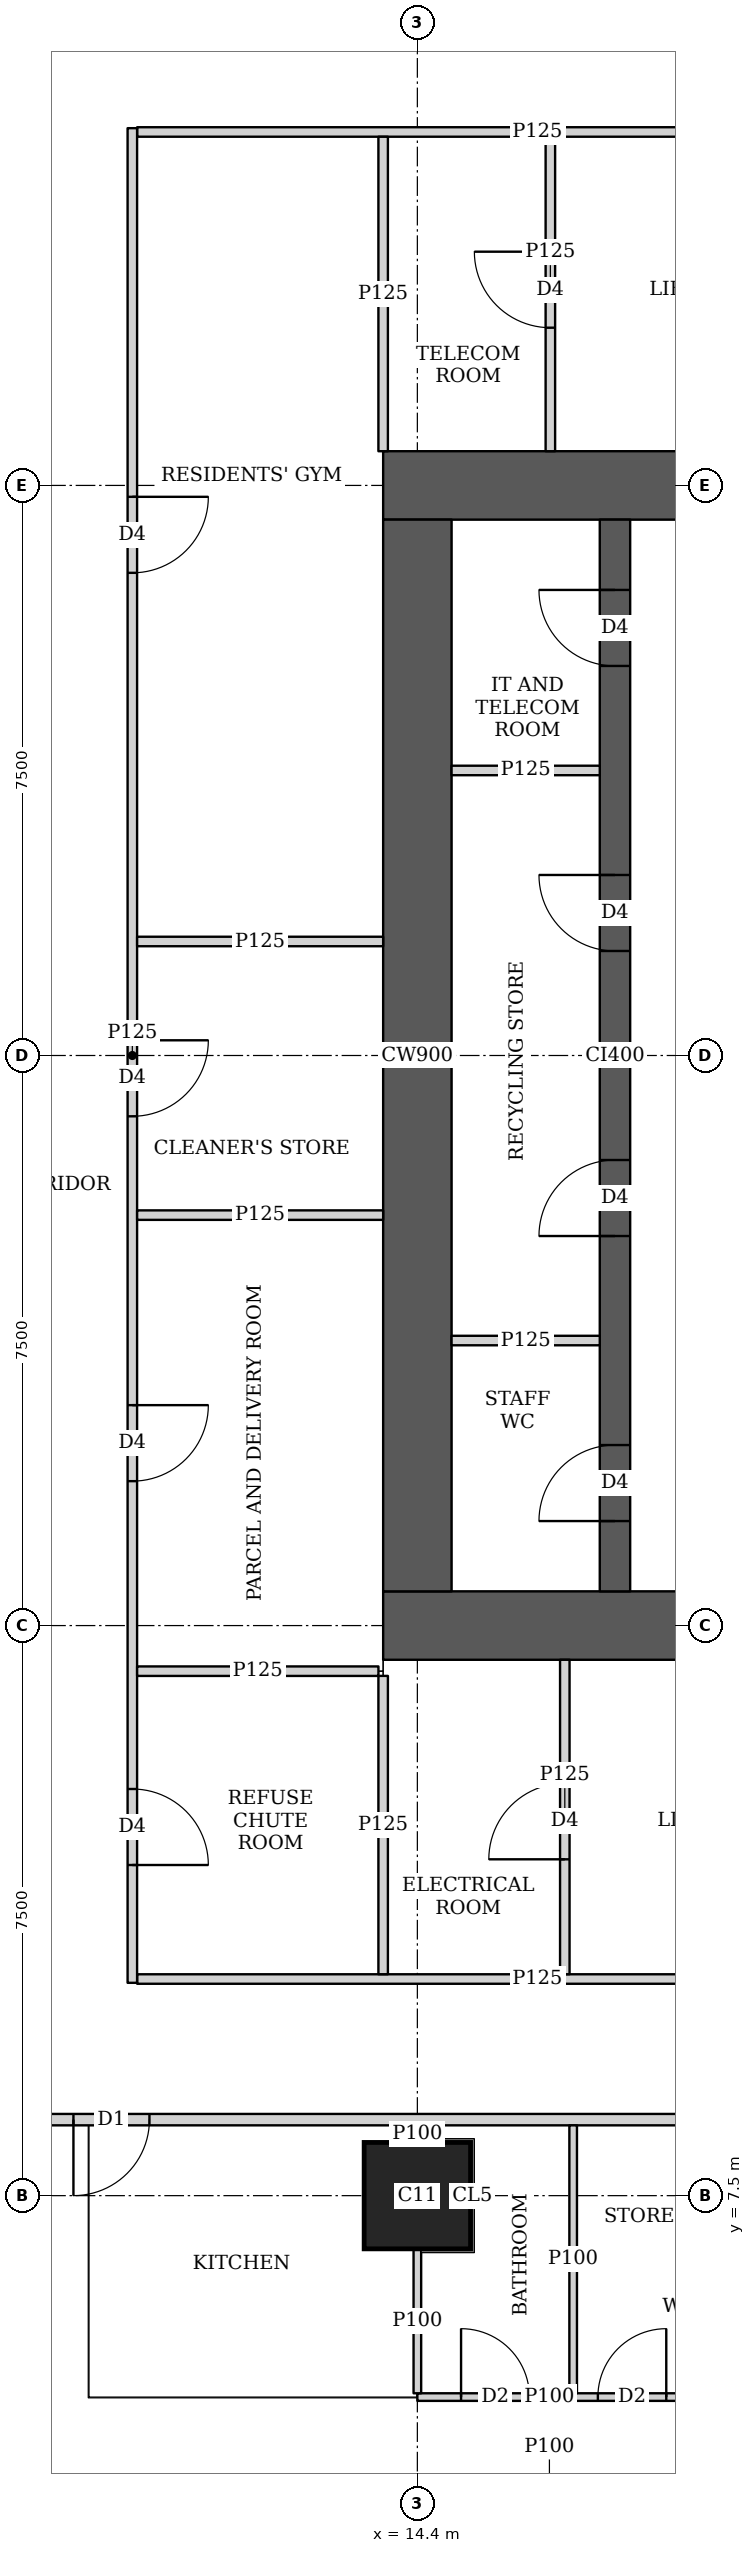
"""IFC4 building model, lengths in metres.
Left out: names, types, materials, properties, quantities, classifications, styles, units other than length and angle.
Written with IfcOpenShell. Run it as: python <this file> out.ifc"""

import sys

from ifc_helpers import new_model, si_unit, direction, frame, frame_2d, origin, origin_2d, place, context, subcontext, project, spatial, rectangle, extrude, element, fill, save


model = new_model("IFC4")
c1 = context("Model", 3, precision=1e-05, world=origin(), true_north=direction((0.0, 1.0)))
c2 = subcontext(c1, "Body", "Model", "MODEL_VIEW")
j1 = project(units=[si_unit("LENGTHUNIT", "METRE"), si_unit("PLANEANGLEUNIT", "RADIAN")], contexts=[c1])
p1 = place(None, origin())
s1 = spatial("IfcSite", under=j1, at=p1, CompositionType="ELEMENT")
p2 = place(p1, origin())
s2 = spatial("IfcBuilding", under=s1, at=p2, CompositionType="ELEMENT")
p3 = place(p2, frame((0.0, 0.0, 204.95)))
s3 = spatial("IfcBuildingStorey", under=s2, at=p3, CompositionType="ELEMENT", Elevation=204.95)
p4 = place(p3, frame((14.4, 7.5, 0.0), z_axis=(0.0, 0.0, 1.0), x_axis=(1.0, 0.0, 0.0)))
e1 = element("IfcColumn", 1, at=p4, inside=s3, PredefinedType="COLUMN", context=c2, shape_type="SweptSolid", body=[
    extrude(rectangle(XDim=1.4, YDim=1.4, at=origin_2d()), origin(), (0.0, 0.0, 1.0), 3.75),
])
p5 = place(p3, frame((13.95, 15.0, 0.0), z_axis=(0.0, 0.0, 1.0), x_axis=(1.0, 0.0, 0.0)))
e2 = element("IfcWall", 2, at=p5, inside=s3, PredefinedType="SHEAR", context=c2, shape_type="SweptSolid", body=[
    extrude(rectangle(XDim=15.3, YDim=0.9, at=frame_2d((7.65, 0.0))), origin(), (0.0, 0.0, 1.0), 3.75),
])
p6 = place(p5, frame((4.45, 0.0, 0.0)))
e3 = element("IfcOpeningElement", 3, at=p6, cuts=e2, PredefinedType="OPENING", context=c2, shape_type="SweptSolid", body=[
    extrude(rectangle(XDim=1.8, YDim=2.1, at=frame_2d((0.9, 1.05))), frame((0.0, 0.46, 0.0), z_axis=(0.0, -1.0, 0.0), x_axis=(1.0, 0.0, 0.0)), (0.0, 0.0, 1.0), 0.92),
])
p7 = place(p5, frame((10.7, 0.0, 0.0)))
e4 = element("IfcOpeningElement", 4, at=p7, cuts=e2, PredefinedType="OPENING", context=c2, shape_type="SweptSolid", body=[
    extrude(rectangle(XDim=1.1, YDim=2.1, at=frame_2d((0.55, 1.05))), frame((0.0, 0.46, 0.0), z_axis=(0.0, -1.0, 0.0), x_axis=(1.0, 0.0, 0.0)), (0.0, 0.0, 1.0), 0.92),
])
p8 = place(p3, frame((13.95, 30.0, 0.0), z_axis=(0.0, 0.0, 1.0), x_axis=(1.0, 0.0, 0.0)))
e5 = element("IfcWall", 5, at=p8, inside=s3, PredefinedType="SHEAR", context=c2, shape_type="SweptSolid", body=[
    extrude(rectangle(XDim=15.3, YDim=0.9, at=frame_2d((7.65, 0.0))), origin(), (0.0, 0.0, 1.0), 3.75),
])
p9 = place(p8, frame((4.45, 0.0, 0.0)))
e6 = element("IfcOpeningElement", 6, at=p9, cuts=e5, PredefinedType="OPENING", context=c2, shape_type="SweptSolid", body=[
    extrude(rectangle(XDim=1.8, YDim=2.1, at=frame_2d((0.9, 1.05))), frame((0.0, 0.46, 0.0), z_axis=(0.0, -1.0, 0.0), x_axis=(1.0, 0.0, 0.0)), (0.0, 0.0, 1.0), 0.92),
])
p10 = place(p8, frame((10.7, 0.0, 0.0)))
e7 = element("IfcOpeningElement", 7, at=p10, cuts=e5, PredefinedType="OPENING", context=c2, shape_type="SweptSolid", body=[
    extrude(rectangle(XDim=1.1, YDim=2.1, at=frame_2d((0.55, 1.05))), frame((0.0, 0.46, 0.0), z_axis=(0.0, -1.0, 0.0), x_axis=(1.0, 0.0, 0.0)), (0.0, 0.0, 1.0), 0.92),
])
p11 = place(p3, frame((14.4, 15.45, 0.0), z_axis=(0.0, 0.0, 1.0), x_axis=(0.0, 1.0, 0.0)))
e8 = element("IfcWall", 8, at=p11, inside=s3, PredefinedType="SHEAR", context=c2, shape_type="SweptSolid", body=[
    extrude(rectangle(XDim=14.1, YDim=0.9, at=frame_2d((7.05, 0.0))), origin(), (0.0, 0.0, 1.0), 3.75),
])
p12 = place(p3, frame((17.0, 15.45, 0.0), z_axis=(0.0, 0.0, 1.0), x_axis=(0.0, 1.0, 0.0)))
e9 = element("IfcWall", 9, at=p12, inside=s3, PredefinedType="SHEAR", context=c2, shape_type="SweptSolid", body=[
    extrude(rectangle(XDim=14.1, YDim=0.4, at=frame_2d((7.05, 0.0))), origin(), (0.0, 0.0, 1.0), 3.75),
])
p13 = place(p12, frame((0.925, 0.0, 0.0)))
e10 = element("IfcOpeningElement", 10, at=p13, cuts=e9, PredefinedType="OPENING", context=c2, shape_type="SweptSolid", body=[
    extrude(rectangle(XDim=1.0, YDim=2.1, at=frame_2d((0.5, 1.05))), frame((0.0, 0.21, 0.0), z_axis=(0.0, -1.0, 0.0), x_axis=(1.0, 0.0, 0.0)), (0.0, 0.0, 1.0), 0.42),
])
p14 = place(p12, frame((4.675, 0.0, 0.0)))
e11 = element("IfcOpeningElement", 11, at=p14, cuts=e9, PredefinedType="OPENING", context=c2, shape_type="SweptSolid", body=[
    extrude(rectangle(XDim=1.0, YDim=2.1, at=frame_2d((0.5, 1.05))), frame((0.0, 0.21, 0.0), z_axis=(0.0, -1.0, 0.0), x_axis=(1.0, 0.0, 0.0)), (0.0, 0.0, 1.0), 0.42),
])
p15 = place(p12, frame((8.425, 0.0, 0.0)))
e12 = element("IfcOpeningElement", 12, at=p15, cuts=e9, PredefinedType="OPENING", context=c2, shape_type="SweptSolid", body=[
    extrude(rectangle(XDim=1.0, YDim=2.1, at=frame_2d((0.5, 1.05))), frame((0.0, 0.21, 0.0), z_axis=(0.0, -1.0, 0.0), x_axis=(1.0, 0.0, 0.0)), (0.0, 0.0, 1.0), 0.42),
])
p16 = place(p12, frame((12.175, 0.0, 0.0)))
e13 = element("IfcOpeningElement", 13, at=p16, cuts=e9, PredefinedType="OPENING", context=c2, shape_type="SweptSolid", body=[
    extrude(rectangle(XDim=1.0, YDim=2.1, at=frame_2d((0.5, 1.05))), frame((0.0, 0.21, 0.0), z_axis=(0.0, -1.0, 0.0), x_axis=(1.0, 0.0, 0.0)), (0.0, 0.0, 1.0), 0.42),
])
p17 = place(p3, frame((40.053, 8.5, 0.0), z_axis=(0.0, 0.0, 1.0), x_axis=(-1.0, 0.0, 0.0)))
e14 = element("IfcWall", 14, at=p17, inside=s3, PredefinedType="SOLIDWALL", context=c2, shape_type="SweptSolid", body=[
    extrude(rectangle(XDim=31.052, YDim=0.15, at=frame_2d((15.526, 0.0))), origin(), (0.0, 0.0, 1.0), 3.5),
])
p18 = place(p17, frame((29.178, 0.0, 0.0)))
e15 = element("IfcOpeningElement", 15, at=p18, cuts=e14, PredefinedType="OPENING", context=c2, shape_type="SweptSolid", body=[
    extrude(rectangle(XDim=1.0, YDim=2.1, at=frame_2d((0.5, 1.05))), frame((0.0, 0.085, 0.0), z_axis=(0.0, -1.0, 0.0), x_axis=(1.0, 0.0, 0.0)), (0.0, 0.0, 1.0), 0.17),
])
p19 = place(p17, frame((19.953, 0.0, 0.0)))
e16 = element("IfcOpeningElement", 16, at=p19, cuts=e14, PredefinedType="OPENING", context=c2, shape_type="SweptSolid", body=[
    extrude(rectangle(XDim=1.0, YDim=2.1, at=frame_2d((0.5, 1.05))), frame((0.0, 0.085, 0.0), z_axis=(0.0, -1.0, 0.0), x_axis=(1.0, 0.0, 0.0)), (0.0, 0.0, 1.0), 0.17),
])
p20 = place(p17, frame((12.753, 0.0, 0.0)))
e17 = element("IfcOpeningElement", 17, at=p20, cuts=e14, PredefinedType="OPENING", context=c2, shape_type="SweptSolid", body=[
    extrude(rectangle(XDim=1.0, YDim=2.1, at=frame_2d((0.5, 1.05))), frame((0.0, 0.085, 0.0), z_axis=(0.0, -1.0, 0.0), x_axis=(1.0, 0.0, 0.0)), (0.0, 0.0, 1.0), 0.17),
])
p21 = place(p17, frame((0.15, 0.0, 0.0)))
e18 = element("IfcOpeningElement", 18, at=p21, cuts=e14, PredefinedType="OPENING", context=c2, shape_type="SweptSolid", body=[
    extrude(rectangle(XDim=1.0, YDim=2.1, at=frame_2d((0.5, 1.05))), frame((0.0, 0.085, 0.0), z_axis=(0.0, -1.0, 0.0), x_axis=(1.0, 0.0, 0.0)), (0.0, 0.0, 1.0), 0.17),
])
p22 = place(p3, frame((17.875, 4.85, 0.0), z_axis=(0.0, 0.0, 1.0), x_axis=(-1.0, 0.0, 0.0)))
e19 = element("IfcWall", 19, at=p22, inside=s3, PredefinedType="PARTITIONING", context=c2, shape_type="SweptSolid", body=[
    extrude(rectangle(XDim=3.475, YDim=0.1, at=frame_2d((1.738, 0.0))), origin(), (0.0, 0.0, 1.0), 3.5),
])
p23 = place(p22, frame((2.0, 0.0, 0.0)))
e20 = element("IfcOpeningElement", 20, at=p23, cuts=e19, PredefinedType="OPENING", context=c2, shape_type="SweptSolid", body=[
    extrude(rectangle(XDim=0.9, YDim=2.1, at=frame_2d((0.45, 1.05))), frame((0.0, 0.06, 0.0), z_axis=(0.0, -1.0, 0.0), x_axis=(1.0, 0.0, 0.0)), (0.0, 0.0, 1.0), 0.12),
])
p24 = place(p22, frame((0.2, 0.0, 0.0)))
e21 = element("IfcOpeningElement", 21, at=p24, cuts=e19, PredefinedType="OPENING", context=c2, shape_type="SweptSolid", body=[
    extrude(rectangle(XDim=0.9, YDim=2.1, at=frame_2d((0.45, 1.05))), frame((0.0, 0.06, 0.0), z_axis=(0.0, -1.0, 0.0), x_axis=(1.0, 0.0, 0.0)), (0.0, 0.0, 1.0), 0.12),
])
p25 = place(p3, frame((14.4, 4.9, 0.0), z_axis=(0.0, 0.0, 1.0), x_axis=(0.0, 1.0, 0.0)))
e22 = element("IfcWall", 22, at=p25, inside=s3, PredefinedType="PARTITIONING", context=c2, shape_type="SweptSolid", body=[
    extrude(rectangle(XDim=1.899, YDim=0.1, at=frame_2d((0.95, 0.0))), origin(), (0.0, 0.0, 1.0), 3.5),
])
p26 = place(p3, frame((14.4, 8.201, 0.0), z_axis=(0.0, 0.0, 1.0), x_axis=(0.0, 1.0, 0.0)))
e23 = element("IfcWall", 23, at=p26, inside=s3, PredefinedType="PARTITIONING", context=c2, shape_type="SweptSolid", body=[
    extrude(rectangle(XDim=0.224, YDim=0.1, at=frame_2d((0.112, 0.0))), origin(), (0.0, 0.0, 1.0), 3.5),
])
p27 = place(p3, frame((16.45, 4.9, 0.0), z_axis=(0.0, 0.0, 1.0), x_axis=(0.0, 1.0, 0.0)))
e24 = element("IfcWall", 24, at=p27, inside=s3, PredefinedType="PARTITIONING", context=c2, shape_type="SweptSolid", body=[
    extrude(rectangle(XDim=3.525, YDim=0.1, at=frame_2d((1.763, 0.0))), origin(), (0.0, 0.0, 1.0), 3.5),
])
p28 = place(p3, frame((10.65, 10.3, 0.0), z_axis=(0.0, 0.0, 1.0), x_axis=(0.0, 1.0, 0.0)))
e25 = element("IfcWall", 25, at=p28, inside=s3, PredefinedType="PARTITIONING", context=c2, shape_type="SweptSolid", body=[
    extrude(rectangle(XDim=24.4, YDim=0.125, at=frame_2d((12.2, 0.0))), origin(), (0.0, 0.0, 1.0), 3.5),
])
p29 = place(p28, frame((1.55, 0.0, 0.0)))
e26 = element("IfcOpeningElement", 26, at=p29, cuts=e25, PredefinedType="OPENING", context=c2, shape_type="SweptSolid", body=[
    extrude(rectangle(XDim=1.0, YDim=2.1, at=frame_2d((0.5, 1.05))), frame((0.0, 0.073, 0.0), z_axis=(0.0, -1.0, 0.0), x_axis=(1.0, 0.0, 0.0)), (0.0, 0.0, 1.0), 0.145),
])
p30 = place(p28, frame((6.6, 0.0, 0.0)))
e27 = element("IfcOpeningElement", 27, at=p30, cuts=e25, PredefinedType="OPENING", context=c2, shape_type="SweptSolid", body=[
    extrude(rectangle(XDim=1.0, YDim=2.1, at=frame_2d((0.5, 1.05))), frame((0.0, 0.073, 0.0), z_axis=(0.0, -1.0, 0.0), x_axis=(1.0, 0.0, 0.0)), (0.0, 0.0, 1.0), 0.145),
])
p31 = place(p28, frame((11.4, 0.0, 0.0)))
e28 = element("IfcOpeningElement", 28, at=p31, cuts=e25, PredefinedType="OPENING", context=c2, shape_type="SweptSolid", body=[
    extrude(rectangle(XDim=1.0, YDim=2.1, at=frame_2d((0.5, 1.05))), frame((0.0, 0.073, 0.0), z_axis=(0.0, -1.0, 0.0), x_axis=(1.0, 0.0, 0.0)), (0.0, 0.0, 1.0), 0.145),
])
p32 = place(p28, frame((18.55, 0.0, 0.0)))
e29 = element("IfcOpeningElement", 29, at=p32, cuts=e25, PredefinedType="OPENING", context=c2, shape_type="SweptSolid", body=[
    extrude(rectangle(XDim=1.0, YDim=2.1, at=frame_2d((0.5, 1.05))), frame((0.0, 0.073, 0.0), z_axis=(0.0, -1.0, 0.0), x_axis=(1.0, 0.0, 0.0)), (0.0, 0.0, 1.0), 0.145),
])
p33 = place(p3, frame((10.713, 14.4, 0.0), z_axis=(0.0, 0.0, 1.0), x_axis=(1.0, 0.0, 0.0)))
e30 = element("IfcWall", 30, at=p33, inside=s3, PredefinedType="PARTITIONING", context=c2, shape_type="SweptSolid", body=[
    extrude(rectangle(XDim=3.175, YDim=0.125, at=frame_2d((1.587, 0.0))), origin(), (0.0, 0.0, 1.0), 3.5),
])
for number, where, z_axis, x_axis in (
    (31, (10.713, 20.4, 0.0), (0.0, 0.0, 1.0), (1.0, 0.0, 0.0)),
    (32, (10.713, 24.0, 0.0), (0.0, 0.0, 1.0), (1.0, 0.0, 0.0)),
):
    element("IfcWall", number, at=place(p3, frame(where, z_axis=z_axis, x_axis=x_axis)), inside=s3, PredefinedType="PARTITIONING", context=c2, shape_type="SweptSolid", body=[
        extrude(rectangle(XDim=3.237, YDim=0.125, at=frame_2d((1.619, 0.0))), origin(), (0.0, 0.0, 1.0), 3.5),
    ])
p34 = place(p3, frame((13.95, 10.413, 0.0), z_axis=(0.0, 0.0, 1.0), x_axis=(0.0, 1.0, 0.0)))
e33 = element("IfcWall", 33, at=p34, inside=s3, PredefinedType="PARTITIONING", context=c2, shape_type="SweptSolid", body=[
    extrude(rectangle(XDim=3.925, YDim=0.125, at=frame_2d((1.962, 0.0))), origin(), (0.0, 0.0, 1.0), 3.5),
])
p35 = place(p3, frame((13.95, 30.45, 0.0), z_axis=(0.0, 0.0, 1.0), x_axis=(0.0, 1.0, 0.0)))
e34 = element("IfcWall", 34, at=p35, inside=s3, PredefinedType="PARTITIONING", context=c2, shape_type="SweptSolid", body=[
    extrude(rectangle(XDim=4.137, YDim=0.125, at=frame_2d((2.068, 0.0))), origin(), (0.0, 0.0, 1.0), 3.5),
])
p36 = place(p3, frame((10.713, 10.35, 0.0), z_axis=(0.0, 0.0, 1.0), x_axis=(1.0, 0.0, 0.0)))
e35 = element("IfcWall", 35, at=p36, inside=s3, PredefinedType="PARTITIONING", context=c2, shape_type="SweptSolid", body=[
    extrude(rectangle(XDim=10.537, YDim=0.125, at=frame_2d((5.269, 0.0))), origin(), (0.0, 0.0, 1.0), 3.5),
])
p37 = place(p36, frame((7.282, 0.0, 0.0)))
e36 = element("IfcOpeningElement", 36, at=p37, cuts=e35, PredefinedType="OPENING", context=c2, shape_type="SweptSolid", body=[
    extrude(rectangle(XDim=1.8, YDim=2.1, at=frame_2d((0.9, 1.05))), frame((0.0, 0.073, 0.0), z_axis=(0.0, -1.0, 0.0), x_axis=(1.0, 0.0, 0.0)), (0.0, 0.0, 1.0), 0.145),
])
p38 = place(p3, frame((10.713, 34.65, 0.0), z_axis=(0.0, 0.0, 1.0), x_axis=(1.0, 0.0, 0.0)))
e37 = element("IfcWall", 37, at=p38, inside=s3, PredefinedType="PARTITIONING", context=c2, shape_type="SweptSolid", body=[
    extrude(rectangle(XDim=10.537, YDim=0.125, at=frame_2d((5.269, 0.0))), origin(), (0.0, 0.0, 1.0), 3.5),
])
p39 = place(p38, frame((7.187, 0.0, 0.0)))
e38 = element("IfcOpeningElement", 38, at=p39, cuts=e37, PredefinedType="OPENING", context=c2, shape_type="SweptSolid", body=[
    extrude(rectangle(XDim=1.8, YDim=2.1, at=frame_2d((0.9, 1.05))), frame((0.0, 0.073, 0.0), z_axis=(0.0, -1.0, 0.0), x_axis=(1.0, 0.0, 0.0)), (0.0, 0.0, 1.0), 0.145),
])
p40 = place(p3, frame((16.34, 10.413, 0.0), z_axis=(0.0, 0.0, 1.0), x_axis=(0.0, 1.0, 0.0)))
e39 = element("IfcWall", 39, at=p40, inside=s3, PredefinedType="PARTITIONING", context=c2, shape_type="SweptSolid", body=[
    extrude(rectangle(XDim=4.137, YDim=0.125, at=frame_2d((2.068, 0.0))), origin(), (0.0, 0.0, 1.0), 3.5),
])
p41 = place(p40, frame((1.512, 0.0, 0.0)))
e40 = element("IfcOpeningElement", 40, at=p41, cuts=e39, PredefinedType="OPENING", context=c2, shape_type="SweptSolid", body=[
    extrude(rectangle(XDim=1.0, YDim=2.1, at=frame_2d((0.5, 1.05))), frame((0.0, 0.073, 0.0), z_axis=(0.0, -1.0, 0.0), x_axis=(1.0, 0.0, 0.0)), (0.0, 0.0, 1.0), 0.145),
])
p42 = place(p3, frame((16.15, 30.45, 0.0), z_axis=(0.0, 0.0, 1.0), x_axis=(0.0, 1.0, 0.0)))
e41 = element("IfcWall", 41, at=p42, inside=s3, PredefinedType="PARTITIONING", context=c2, shape_type="SweptSolid", body=[
    extrude(rectangle(XDim=4.137, YDim=0.125, at=frame_2d((2.068, 0.0))), origin(), (0.0, 0.0, 1.0), 3.5),
])
p43 = place(p42, frame((1.625, 0.0, 0.0)))
e42 = element("IfcOpeningElement", 42, at=p43, cuts=e41, PredefinedType="OPENING", context=c2, shape_type="SweptSolid", body=[
    extrude(rectangle(XDim=1.0, YDim=2.1, at=frame_2d((0.5, 1.05))), frame((0.0, 0.073, 0.0), z_axis=(0.0, -1.0, 0.0), x_axis=(1.0, 0.0, 0.0)), (0.0, 0.0, 1.0), 0.145),
])
for number, where, z_axis, x_axis in (
    (43, (14.85, 18.75, 0.0), (0.0, 0.0, 1.0), (1.0, 0.0, 0.0)),
    (44, (14.85, 26.25, 0.0), (0.0, 0.0, 1.0), (1.0, 0.0, 0.0)),
):
    element("IfcWall", number, at=place(p3, frame(where, z_axis=z_axis, x_axis=x_axis)), inside=s3, PredefinedType="PARTITIONING", context=c2, shape_type="SweptSolid", body=[
        extrude(rectangle(XDim=1.95, YDim=0.125, at=frame_2d((0.975, 0.0))), origin(), (0.0, 0.0, 1.0), 3.5),
    ])
p44 = place(p23, origin())
e45 = element("IfcDoor", 45, at=p44, inside=s3, OperationType="SINGLE_SWING_LEFT", PredefinedType="DOOR", context=c2, shape_type="SweptSolid", body=[
    extrude(rectangle(XDim=0.9, YDim=2.1, at=frame_2d((0.45, 1.05))), frame((0.0, 0.025, 0.0), z_axis=(0.0, -1.0, 0.0), x_axis=(1.0, 0.0, 0.0)), (0.0, 0.0, 1.0), 0.05),
])
fill(e20, e45)
p45 = place(p24, origin())
e46 = element("IfcDoor", 46, at=p45, inside=s3, OperationType="SINGLE_SWING_RIGHT", PredefinedType="DOOR", context=c2, shape_type="SweptSolid", body=[
    extrude(rectangle(XDim=0.9, YDim=2.1, at=frame_2d((0.45, 1.05))), frame((0.0, 0.025, 0.0), z_axis=(0.0, -1.0, 0.0), x_axis=(1.0, 0.0, 0.0)), (0.0, 0.0, 1.0), 0.05),
])
fill(e21, e46)
p46 = place(p18, origin())
e47 = element("IfcDoor", 47, at=p46, inside=s3, OperationType="SINGLE_SWING_RIGHT", PredefinedType="DOOR", context=c2, shape_type="SweptSolid", body=[
    extrude(rectangle(XDim=1.0, YDim=2.1, at=frame_2d((0.5, 1.05))), frame((0.0, 0.025, 0.0), z_axis=(0.0, -1.0, 0.0), x_axis=(1.0, 0.0, 0.0)), (0.0, 0.0, 1.0), 0.05),
])
fill(e15, e47)
p47 = place(p29, origin())
e48 = element("IfcDoor", 48, at=p47, inside=s3, OperationType="SINGLE_SWING_RIGHT", PredefinedType="DOOR", context=c2, shape_type="SweptSolid", body=[
    extrude(rectangle(XDim=1.0, YDim=2.1, at=frame_2d((0.5, 1.05))), frame((0.0, 0.025, 0.0), z_axis=(0.0, -1.0, 0.0), x_axis=(1.0, 0.0, 0.0)), (0.0, 0.0, 1.0), 0.05),
])
fill(e26, e48)
p48 = place(p30, origin())
e49 = element("IfcDoor", 49, at=p48, inside=s3, OperationType="SINGLE_SWING_LEFT", PredefinedType="DOOR", context=c2, shape_type="SweptSolid", body=[
    extrude(rectangle(XDim=1.0, YDim=2.1, at=frame_2d((0.5, 1.05))), frame((0.0, 0.025, 0.0), z_axis=(0.0, -1.0, 0.0), x_axis=(1.0, 0.0, 0.0)), (0.0, 0.0, 1.0), 0.05),
])
fill(e27, e49)
p49 = place(p31, origin())
e50 = element("IfcDoor", 50, at=p49, inside=s3, OperationType="SINGLE_SWING_LEFT", PredefinedType="DOOR", context=c2, shape_type="SweptSolid", body=[
    extrude(rectangle(XDim=1.0, YDim=2.1, at=frame_2d((0.5, 1.05))), frame((0.0, 0.025, 0.0), z_axis=(0.0, -1.0, 0.0), x_axis=(1.0, 0.0, 0.0)), (0.0, 0.0, 1.0), 0.05),
])
fill(e28, e50)
p50 = place(p32, origin())
e51 = element("IfcDoor", 51, at=p50, inside=s3, OperationType="SINGLE_SWING_LEFT", PredefinedType="DOOR", context=c2, shape_type="SweptSolid", body=[
    extrude(rectangle(XDim=1.0, YDim=2.1, at=frame_2d((0.5, 1.05))), frame((0.0, 0.025, 0.0), z_axis=(0.0, -1.0, 0.0), x_axis=(1.0, 0.0, 0.0)), (0.0, 0.0, 1.0), 0.05),
])
fill(e29, e51)
p51 = place(p41, origin())
e52 = element("IfcDoor", 52, at=p51, inside=s3, OperationType="SINGLE_SWING_LEFT", PredefinedType="DOOR", context=c2, shape_type="SweptSolid", body=[
    extrude(rectangle(XDim=1.0, YDim=2.1, at=frame_2d((0.5, 1.05))), frame((0.0, 0.025, 0.0), z_axis=(0.0, -1.0, 0.0), x_axis=(1.0, 0.0, 0.0)), (0.0, 0.0, 1.0), 0.05),
])
fill(e40, e52)
p52 = place(p43, origin())
e53 = element("IfcDoor", 53, at=p52, inside=s3, OperationType="SINGLE_SWING_RIGHT", PredefinedType="DOOR", context=c2, shape_type="SweptSolid", body=[
    extrude(rectangle(XDim=1.0, YDim=2.1, at=frame_2d((0.5, 1.05))), frame((0.0, 0.025, 0.0), z_axis=(0.0, -1.0, 0.0), x_axis=(1.0, 0.0, 0.0)), (0.0, 0.0, 1.0), 0.05),
])
fill(e42, e53)
p53 = place(p13, origin())
e54 = element("IfcDoor", 54, at=p53, inside=s3, OperationType="SINGLE_SWING_LEFT", PredefinedType="DOOR", context=c2, shape_type="SweptSolid", body=[
    extrude(rectangle(XDim=1.0, YDim=2.1, at=frame_2d((0.5, 1.05))), frame((0.0, 0.025, 0.0), z_axis=(0.0, -1.0, 0.0), x_axis=(1.0, 0.0, 0.0)), (0.0, 0.0, 1.0), 0.05),
])
fill(e10, e54)
p54 = place(p14, origin())
e55 = element("IfcDoor", 55, at=p54, inside=s3, OperationType="SINGLE_SWING_LEFT", PredefinedType="DOOR", context=c2, shape_type="SweptSolid", body=[
    extrude(rectangle(XDim=1.0, YDim=2.1, at=frame_2d((0.5, 1.05))), frame((0.0, 0.025, 0.0), z_axis=(0.0, -1.0, 0.0), x_axis=(1.0, 0.0, 0.0)), (0.0, 0.0, 1.0), 0.05),
])
fill(e11, e55)
p55 = place(p15, origin())
e56 = element("IfcDoor", 56, at=p55, inside=s3, OperationType="SINGLE_SWING_RIGHT", PredefinedType="DOOR", context=c2, shape_type="SweptSolid", body=[
    extrude(rectangle(XDim=1.0, YDim=2.1, at=frame_2d((0.5, 1.05))), frame((0.0, 0.025, 0.0), z_axis=(0.0, -1.0, 0.0), x_axis=(1.0, 0.0, 0.0)), (0.0, 0.0, 1.0), 0.05),
])
fill(e12, e56)
p56 = place(p16, origin())
e57 = element("IfcDoor", 57, at=p56, inside=s3, OperationType="SINGLE_SWING_RIGHT", PredefinedType="DOOR", context=c2, shape_type="SweptSolid", body=[
    extrude(rectangle(XDim=1.0, YDim=2.1, at=frame_2d((0.5, 1.05))), frame((0.0, 0.025, 0.0), z_axis=(0.0, -1.0, 0.0), x_axis=(1.0, 0.0, 0.0)), (0.0, 0.0, 1.0), 0.05),
])
fill(e13, e57)
save(model, sys.argv[1])
